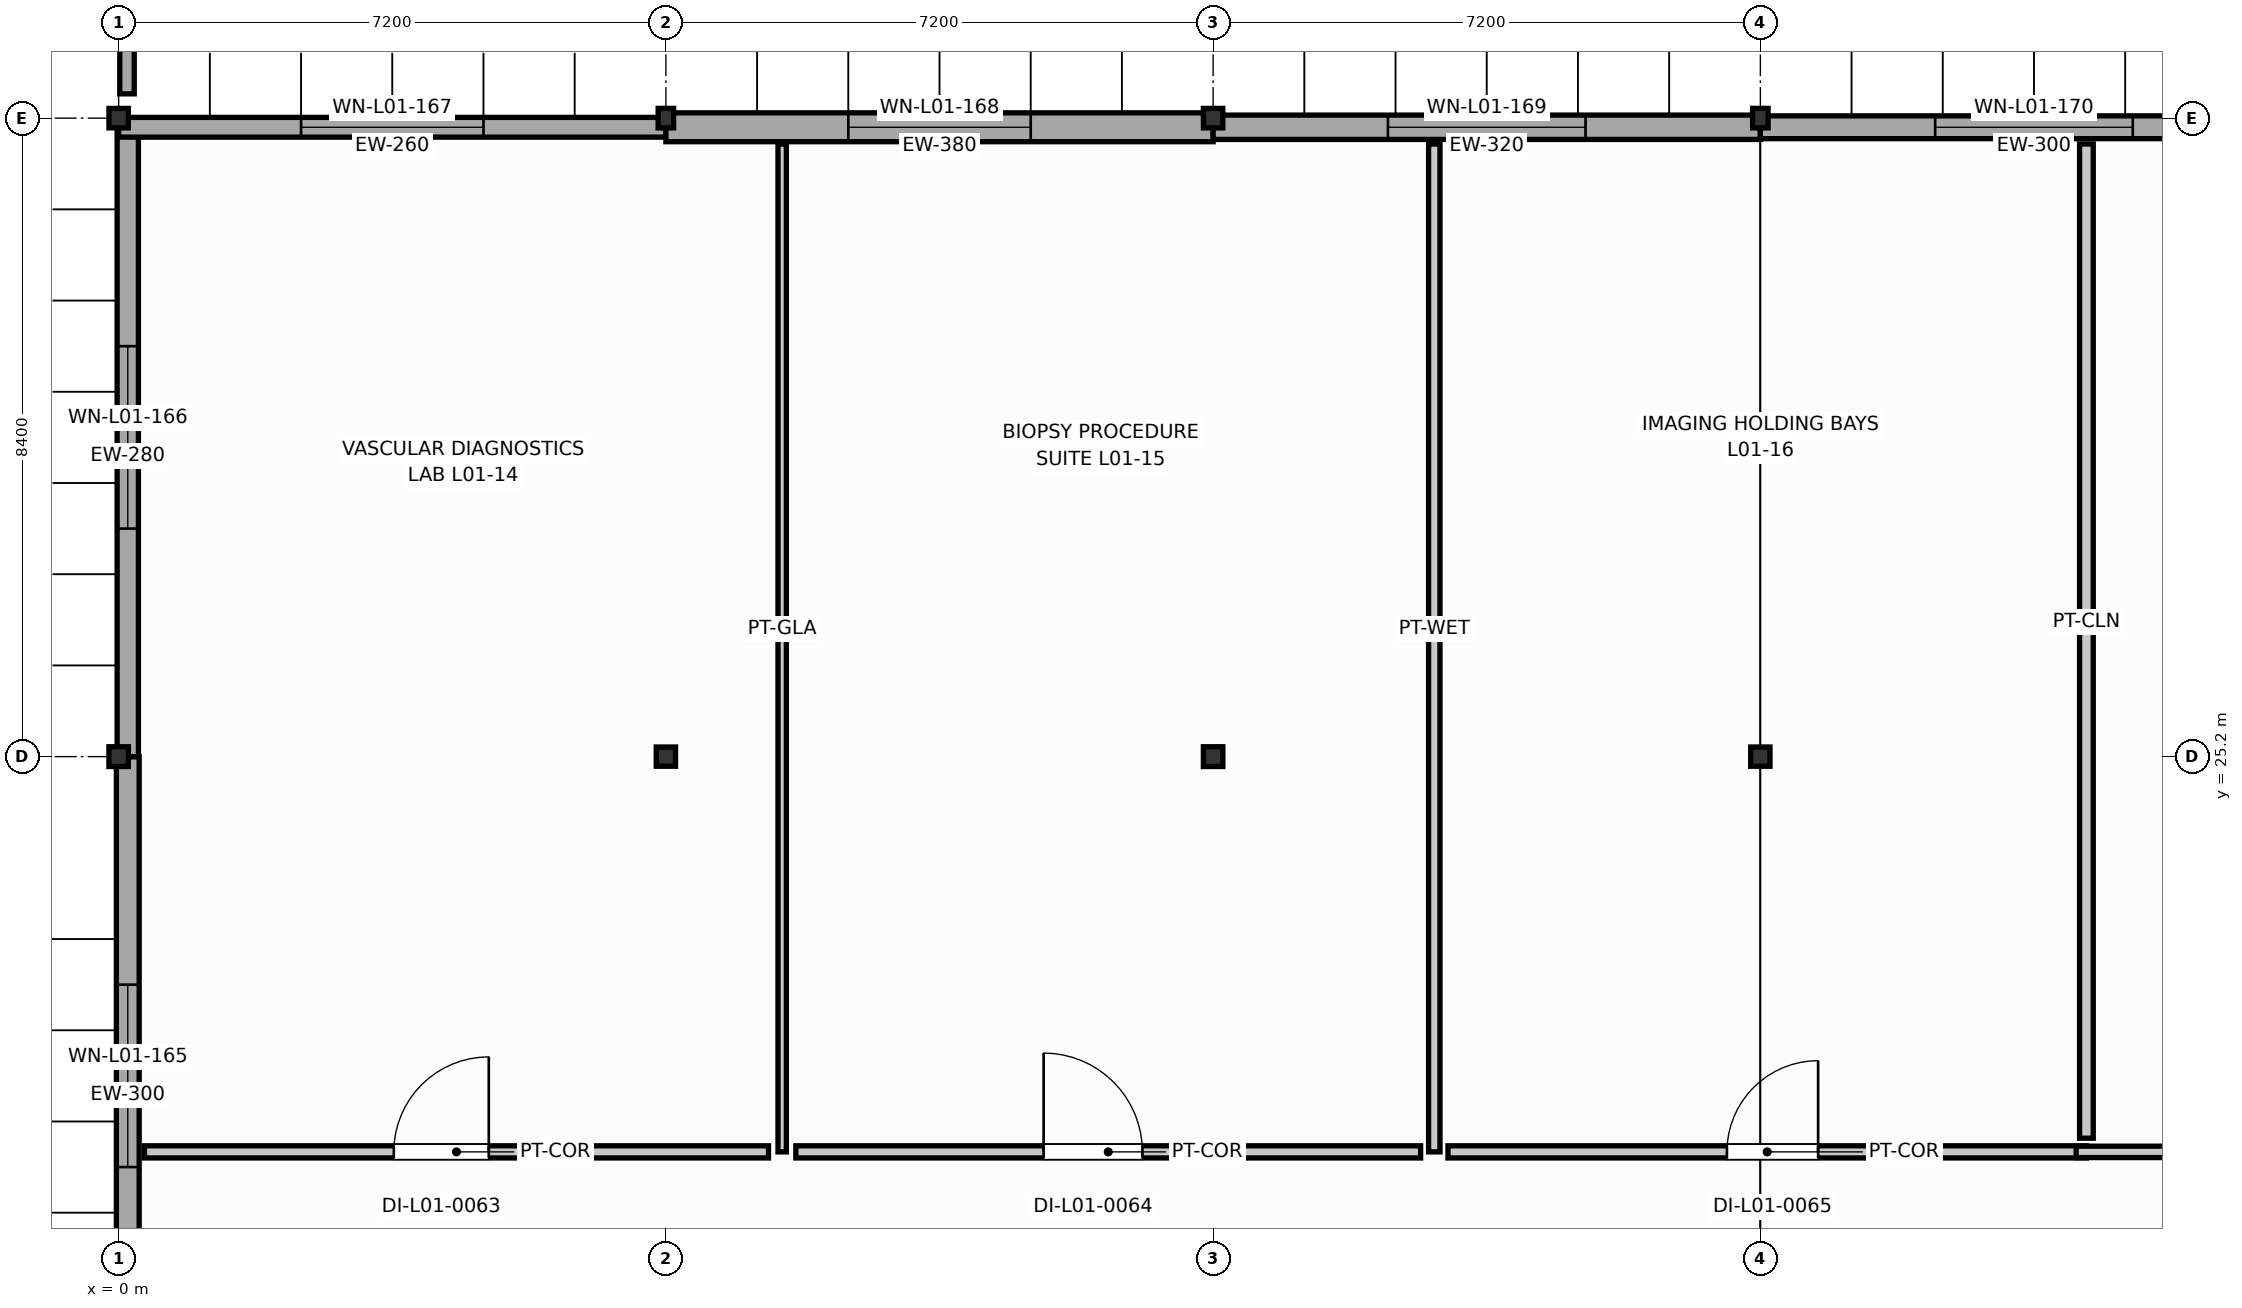
"""IFC4 building model, lengths in metres.
Left out: names, types, materials, properties, quantities, classifications, styles, units other than length and angle.
Written with IfcOpenShell. Run it as: python <this file> out.ifc"""

import sys

from ifc_helpers import new_model, si_unit, direction, frame, frame_2d, origin, origin_2d, place, context, subcontext, project, spatial, rectangle, i_section, extrude, element, fill, save


model = new_model("IFC4")
c1 = context("Model", 3, precision=1e-05, world=origin(), true_north=direction((0.0, 1.0)))
c2 = subcontext(c1, "Body", "Model", "MODEL_VIEW")
j1 = project(units=[si_unit("LENGTHUNIT", "METRE"), si_unit("PLANEANGLEUNIT", "RADIAN")], contexts=[c1])
p1 = place(None, origin())
s1 = spatial("IfcSite", under=j1, at=p1, CompositionType="ELEMENT")
p2 = place(p1, origin())
s2 = spatial("IfcBuilding", under=s1, at=p2, CompositionType="ELEMENT")
p3 = place(p2, frame((0.0, 0.0, 4.8)))
s3 = spatial("IfcBuildingStorey", under=s2, at=p3, CompositionType="ELEMENT", Elevation=4.8)
p4 = place(p3, frame((0.0, 25.2, 0.0), z_axis=(0.0, 0.0, 1.0), x_axis=(1.0, 0.0, 0.0)))
e1 = element("IfcColumn", 1, at=p4, inside=s3, PredefinedType="COLUMN", context=c2, shape_type="SweptSolid", body=[
    extrude(i_section(OverallWidth=0.256, OverallDepth=0.26, WebThickness=0.011, FlangeThickness=0.017, FilletRadius=0.013, at=origin_2d()), origin(), (0.0, 0.0, 1.0), 4.2),
])
p5 = place(p3, frame((0.0, 33.6, 0.0), z_axis=(0.0, 0.0, 1.0), x_axis=(1.0, 0.0, 0.0)))
e2 = element("IfcColumn", 2, at=p5, inside=s3, PredefinedType="COLUMN", context=c2, shape_type="SweptSolid", body=[
    extrude(i_section(OverallWidth=0.255, OverallDepth=0.256, WebThickness=0.01, FlangeThickness=0.016, FilletRadius=0.013, at=origin_2d()), origin(), (0.0, 0.0, 1.0), 4.2),
])
p6 = place(p3, frame((7.2, 25.2, 0.0), z_axis=(0.0, 0.0, 1.0), x_axis=(1.0, 0.0, 0.0)))
e3 = element("IfcColumn", 3, at=p6, inside=s3, PredefinedType="COLUMN", context=c2, shape_type="SweptSolid", body=[
    extrude(i_section(OverallWidth=0.254, OverallDepth=0.253, WebThickness=0.009, FlangeThickness=0.014, FilletRadius=0.013, at=origin_2d()), origin(), (0.0, 0.0, 1.0), 4.2),
])
p7 = place(p3, frame((7.2, 33.6, 0.0), z_axis=(0.0, 0.0, 1.0), x_axis=(1.0, 0.0, 0.0)))
e4 = element("IfcColumn", 4, at=p7, inside=s3, PredefinedType="COLUMN", context=c2, shape_type="SweptSolid", body=[
    extrude(i_section(OverallWidth=0.204, OverallDepth=0.257, WebThickness=0.009, FlangeThickness=0.016, FilletRadius=0.013, at=origin_2d()), origin(), (0.0, 0.0, 1.0), 4.2),
])
p8 = place(p3, frame((14.4, 25.2, 0.0), z_axis=(0.0, 0.0, 1.0), x_axis=(1.0, 0.0, 0.0)))
e5 = element("IfcColumn", 5, at=p8, inside=s3, PredefinedType="COLUMN", context=c2, shape_type="SweptSolid", body=[
    extrude(i_section(OverallWidth=0.256, OverallDepth=0.26, WebThickness=0.011, FlangeThickness=0.017, FilletRadius=0.013, at=origin_2d()), origin(), (0.0, 0.0, 1.0), 4.2),
])
p9 = place(p3, frame((14.4, 33.6, 0.0), z_axis=(0.0, 0.0, 1.0), x_axis=(1.0, 0.0, 0.0)))
e6 = element("IfcColumn", 6, at=p9, inside=s3, PredefinedType="COLUMN", context=c2, shape_type="SweptSolid", body=[
    extrude(i_section(OverallWidth=0.255, OverallDepth=0.256, WebThickness=0.01, FlangeThickness=0.016, FilletRadius=0.013, at=origin_2d()), origin(), (0.0, 0.0, 1.0), 4.2),
])
p10 = place(p3, frame((21.6, 25.2, 0.0), z_axis=(0.0, 0.0, 1.0), x_axis=(1.0, 0.0, 0.0)))
e7 = element("IfcColumn", 7, at=p10, inside=s3, PredefinedType="COLUMN", context=c2, shape_type="SweptSolid", body=[
    extrude(i_section(OverallWidth=0.254, OverallDepth=0.253, WebThickness=0.009, FlangeThickness=0.014, FilletRadius=0.013, at=origin_2d()), origin(), (0.0, 0.0, 1.0), 4.2),
])
p11 = place(p3, frame((21.6, 33.6, 0.0), z_axis=(0.0, 0.0, 1.0), x_axis=(1.0, 0.0, 0.0)))
e8 = element("IfcColumn", 8, at=p11, inside=s3, PredefinedType="COLUMN", context=c2, shape_type="SweptSolid", body=[
    extrude(i_section(OverallWidth=0.204, OverallDepth=0.257, WebThickness=0.009, FlangeThickness=0.016, FilletRadius=0.013, at=origin_2d()), origin(), (0.0, 0.0, 1.0), 4.2),
])
p12 = place(p3, frame((0.12, 16.8, 0.0), z_axis=(0.0, 0.0, 1.0), x_axis=(0.0, 1.0, 0.0)))
e9 = element("IfcWall", 9, at=p12, inside=s3, PredefinedType="SOLIDWALL", context=c2, shape_type="SweptSolid", body=[
    extrude(rectangle(XDim=8.4, YDim=0.3, at=frame_2d((4.2, 0.0))), origin(), (0.0, 0.0, 1.0), 3.091),
])
p13 = place(p12, frame((3.0, 0.0, 0.95)))
e10 = element("IfcOpeningElement", 10, at=p13, cuts=e9, PredefinedType="OPENING", context=c2, shape_type="SweptSolid", body=[
    extrude(rectangle(XDim=2.4, YDim=1.15, at=frame_2d((1.2, 0.575))), frame((0.0, 0.16, 0.0), z_axis=(0.0, -1.0, 0.0), x_axis=(1.0, 0.0, 0.0)), (0.0, 0.0, 1.0), 0.32),
])
p14 = place(p3, frame((0.12, 25.2, 0.0), z_axis=(0.0, 0.0, 1.0), x_axis=(0.0, 1.0, 0.0)))
e11 = element("IfcWall", 11, at=p14, inside=s3, PredefinedType="SOLIDWALL", context=c2, shape_type="SweptSolid", body=[
    extrude(rectangle(XDim=8.4, YDim=0.28, at=frame_2d((4.2, 0.0))), origin(), (0.0, 0.0, 1.0), 3.091),
])
p15 = place(p14, frame((3.0, 0.0, 0.95)))
e12 = element("IfcOpeningElement", 12, at=p15, cuts=e11, PredefinedType="OPENING", context=c2, shape_type="SweptSolid", body=[
    extrude(rectangle(XDim=2.4, YDim=1.35, at=frame_2d((1.2, 0.675))), frame((0.0, 0.15, 0.0), z_axis=(0.0, -1.0, 0.0), x_axis=(1.0, 0.0, 0.0)), (0.0, 0.0, 1.0), 0.3),
])
p16 = place(p3, frame((0.0, 33.48, 0.0), z_axis=(0.0, 0.0, 1.0), x_axis=(1.0, 0.0, 0.0)))
e13 = element("IfcWall", 13, at=p16, inside=s3, PredefinedType="SOLIDWALL", context=c2, shape_type="SweptSolid", body=[
    extrude(rectangle(XDim=7.2, YDim=0.26, at=frame_2d((3.6, 0.0))), origin(), (0.0, 0.0, 1.0), 3.482),
])
p17 = place(p16, frame((2.4, 0.0, 0.95)))
e14 = element("IfcOpeningElement", 14, at=p17, cuts=e13, PredefinedType="OPENING", context=c2, shape_type="SweptSolid", body=[
    extrude(rectangle(XDim=2.4, YDim=1.55, at=frame_2d((1.2, 0.775))), frame((0.0, 0.14, 0.0), z_axis=(0.0, -1.0, 0.0), x_axis=(1.0, 0.0, 0.0)), (0.0, 0.0, 1.0), 0.28),
])
p18 = place(p3, frame((7.2, 33.48, 0.0), z_axis=(0.0, 0.0, 1.0), x_axis=(1.0, 0.0, 0.0)))
e15 = element("IfcWall", 15, at=p18, inside=s3, PredefinedType="SOLIDWALL", context=c2, shape_type="SweptSolid", body=[
    extrude(rectangle(XDim=7.2, YDim=0.38, at=frame_2d((3.6, 0.0))), origin(), (0.0, 0.0, 1.0), 3.482),
])
p19 = place(p18, frame((2.4, 0.0, 0.95)))
e16 = element("IfcOpeningElement", 16, at=p19, cuts=e15, PredefinedType="OPENING", context=c2, shape_type="SweptSolid", body=[
    extrude(rectangle(XDim=2.4, YDim=1.75, at=frame_2d((1.2, 0.875))), frame((0.0, 0.2, 0.0), z_axis=(0.0, -1.0, 0.0), x_axis=(1.0, 0.0, 0.0)), (0.0, 0.0, 1.0), 0.4),
])
p20 = place(p3, frame((14.4, 33.48, 0.0), z_axis=(0.0, 0.0, 1.0), x_axis=(1.0, 0.0, 0.0)))
e17 = element("IfcWall", 17, at=p20, inside=s3, PredefinedType="SOLIDWALL", context=c2, shape_type="SweptSolid", body=[
    extrude(rectangle(XDim=7.2, YDim=0.32, at=frame_2d((3.6, 0.0))), origin(), (0.0, 0.0, 1.0), 3.482),
])
p21 = place(p20, frame((2.3, 0.0, 0.95)))
e18 = element("IfcOpeningElement", 18, at=p21, cuts=e17, PredefinedType="OPENING", context=c2, shape_type="SweptSolid", body=[
    extrude(rectangle(XDim=2.6, YDim=1.15, at=frame_2d((1.3, 0.575))), frame((0.0, 0.17, 0.0), z_axis=(0.0, -1.0, 0.0), x_axis=(1.0, 0.0, 0.0)), (0.0, 0.0, 1.0), 0.34),
])
p22 = place(p3, frame((21.6, 33.48, 0.0), z_axis=(0.0, 0.0, 1.0), x_axis=(1.0, 0.0, 0.0)))
e19 = element("IfcWall", 19, at=p22, inside=s3, PredefinedType="SOLIDWALL", context=c2, shape_type="SweptSolid", body=[
    extrude(rectangle(XDim=7.2, YDim=0.3, at=frame_2d((3.6, 0.0))), origin(), (0.0, 0.0, 1.0), 3.245),
])
p23 = place(p22, frame((2.3, 0.0, 0.95)))
e20 = element("IfcOpeningElement", 20, at=p23, cuts=e19, PredefinedType="OPENING", context=c2, shape_type="SweptSolid", body=[
    extrude(rectangle(XDim=2.6, YDim=1.35, at=frame_2d((1.3, 0.675))), frame((0.0, 0.16, 0.0), z_axis=(0.0, -1.0, 0.0), x_axis=(1.0, 0.0, 0.0)), (0.0, 0.0, 1.0), 0.32),
])
p24 = place(p3, frame((0.11, 41.723, 0.0), z_axis=(0.0, 0.0, 1.0), x_axis=(0.0, -1.0, 0.0)))
e21 = element("IfcWall", 21, at=p24, inside=s3, PredefinedType="PARAPET", context=c2, shape_type="SweptSolid", body=[
    extrude(rectangle(XDim=7.803, YDim=0.19, at=frame_2d((3.902, 0.0))), origin(), (0.0, 0.0, 1.0), 1.15),
])
p25 = place(p3, frame((8.73, 33.26, 0.0), z_axis=(0.0, 0.0, 1.0), x_axis=(0.0, -1.0, 0.0)))
e22 = element("IfcWall", 22, at=p25, inside=s3, PredefinedType="MOVABLE", context=c2, shape_type="SweptSolid", body=[
    extrude(rectangle(XDim=13.26, YDim=0.11, at=frame_2d((6.63, 0.0))), origin(), (0.0, 0.0, 1.0), 3.252),
])
p26 = place(p3, frame((8.55, 20.0, 0.0), z_axis=(0.0, 0.0, 1.0), x_axis=(-1.0, 0.0, 0.0)))
e23 = element("IfcWall", 23, at=p26, inside=s3, PredefinedType="PARTITIONING", context=c2, shape_type="SweptSolid", body=[
    extrude(rectangle(XDim=8.21, YDim=0.16, at=frame_2d((4.105, 0.0))), origin(), (0.0, 0.0, 1.0), 3.535),
])
p27 = place(p26, frame((3.68, 0.0, 0.0)))
e24 = element("IfcOpeningElement", 24, at=p27, cuts=e23, PredefinedType="OPENING", context=c2, shape_type="SweptSolid", body=[
    extrude(rectangle(XDim=1.25, YDim=2.15, at=frame_2d((0.625, 1.075))), frame((0.0, 0.09, 0.0), z_axis=(0.0, -1.0, 0.0), x_axis=(1.0, 0.0, 0.0)), (0.0, 0.0, 1.0), 0.18),
])
p28 = place(p3, frame((17.31, 33.26, 0.0), z_axis=(0.0, 0.0, 1.0), x_axis=(0.0, -1.0, 0.0)))
e25 = element("IfcWall", 25, at=p28, inside=s3, PredefinedType="PLUMBINGWALL", context=c2, shape_type="SweptSolid", body=[
    extrude(rectangle(XDim=13.26, YDim=0.15, at=frame_2d((6.63, 0.0))), origin(), (0.0, 0.0, 1.0), 3.257),
])
p29 = place(p3, frame((17.13, 20.0, 0.0), z_axis=(0.0, 0.0, 1.0), x_axis=(-1.0, 0.0, 0.0)))
e26 = element("IfcWall", 26, at=p29, inside=s3, PredefinedType="PARTITIONING", context=c2, shape_type="SweptSolid", body=[
    extrude(rectangle(XDim=8.22, YDim=0.16, at=frame_2d((4.11, 0.0))), origin(), (0.0, 0.0, 1.0), 3.535),
])
p30 = place(p29, frame((3.66, 0.0, 0.0)))
e27 = element("IfcOpeningElement", 27, at=p30, cuts=e26, PredefinedType="OPENING", context=c2, shape_type="SweptSolid", body=[
    extrude(rectangle(XDim=1.3, YDim=2.15, at=frame_2d((0.65, 1.075))), frame((0.0, 0.09, 0.0), z_axis=(0.0, -1.0, 0.0), x_axis=(1.0, 0.0, 0.0)), (0.0, 0.0, 1.0), 0.18),
])
p31 = place(p3, frame((25.89, 20.0, 0.0), z_axis=(0.0, 0.0, 1.0), x_axis=(-1.0, 0.0, 0.0)))
e28 = element("IfcWall", 28, at=p31, inside=s3, PredefinedType="PARTITIONING", context=c2, shape_type="SweptSolid", body=[
    extrude(rectangle(XDim=8.4, YDim=0.16, at=frame_2d((4.2, 0.0))), origin(), (0.0, 0.0, 1.0), 3.531),
])
p32 = place(p31, frame((3.53, 0.0, 0.0)))
e29 = element("IfcOpeningElement", 29, at=p32, cuts=e28, PredefinedType="OPENING", context=c2, shape_type="SweptSolid", body=[
    extrude(rectangle(XDim=1.2, YDim=2.15, at=frame_2d((0.6, 1.075))), frame((0.0, 0.09, 0.0), z_axis=(0.0, -1.0, 0.0), x_axis=(1.0, 0.0, 0.0)), (0.0, 0.0, 1.0), 0.18),
])
p33 = place(p3, frame((25.89, 33.26, 0.0), z_axis=(0.0, 0.0, 1.0), x_axis=(0.0, -1.0, 0.0)))
e30 = element("IfcWall", 30, at=p33, inside=s3, PredefinedType="PARTITIONING", context=c2, shape_type="SweptSolid", body=[
    extrude(rectangle(XDim=13.08, YDim=0.18, at=frame_2d((6.54, 0.0))), origin(), (0.0, 0.0, 1.0), 3.324),
])
p34 = place(p3, frame((34.47, 20.0, 0.0), z_axis=(0.0, 0.0, 1.0), x_axis=(-1.0, 0.0, 0.0)))
e31 = element("IfcWall", 31, at=p34, inside=s3, PredefinedType="PLUMBINGWALL", context=c2, shape_type="SweptSolid", body=[
    extrude(rectangle(XDim=8.715, YDim=0.15, at=frame_2d((4.357, 0.0))), origin(), (0.0, 0.0, 1.0), 3.404),
])
p35 = place(p34, frame((3.788, 0.0, 0.0)))
e32 = element("IfcOpeningElement", 32, at=p35, cuts=e31, PredefinedType="OPENING", context=c2, shape_type="SweptSolid", body=[
    extrude(rectangle(XDim=1.0, YDim=2.1, at=frame_2d((0.5, 1.05))), frame((0.0, 0.085, 0.0), z_axis=(0.0, -1.0, 0.0), x_axis=(1.0, 0.0, 0.0)), (0.0, 0.0, 1.0), 0.17),
])
p36 = place(p13, origin())
e33 = element("IfcWindow", 33, at=p36, inside=s3, PartitioningType="SINGLE_PANEL", PredefinedType="WINDOW", context=c2, shape_type="SweptSolid", body=[
    extrude(rectangle(XDim=2.4, YDim=1.15, at=frame_2d((1.2, 0.575))), frame((0.0, 0.03, 0.0), z_axis=(0.0, -1.0, 0.0), x_axis=(1.0, 0.0, 0.0)), (0.0, 0.0, 1.0), 0.06),
])
fill(e10, e33)
p37 = place(p15, origin())
e34 = element("IfcWindow", 34, at=p37, inside=s3, PartitioningType="SINGLE_PANEL", PredefinedType="WINDOW", context=c2, shape_type="SweptSolid", body=[
    extrude(rectangle(XDim=2.4, YDim=1.35, at=frame_2d((1.2, 0.675))), frame((0.0, 0.03, 0.0), z_axis=(0.0, -1.0, 0.0), x_axis=(1.0, 0.0, 0.0)), (0.0, 0.0, 1.0), 0.06),
])
fill(e12, e34)
p38 = place(p17, origin())
e35 = element("IfcWindow", 35, at=p38, inside=s3, PartitioningType="SINGLE_PANEL", PredefinedType="WINDOW", context=c2, shape_type="SweptSolid", body=[
    extrude(rectangle(XDim=2.4, YDim=1.55, at=frame_2d((1.2, 0.775))), frame((0.0, 0.03, 0.0), z_axis=(0.0, -1.0, 0.0), x_axis=(1.0, 0.0, 0.0)), (0.0, 0.0, 1.0), 0.06),
])
fill(e14, e35)
p39 = place(p19, origin())
e36 = element("IfcWindow", 36, at=p39, inside=s3, PartitioningType="SINGLE_PANEL", PredefinedType="WINDOW", context=c2, shape_type="SweptSolid", body=[
    extrude(rectangle(XDim=2.4, YDim=1.75, at=frame_2d((1.2, 0.875))), frame((0.0, 0.03, 0.0), z_axis=(0.0, -1.0, 0.0), x_axis=(1.0, 0.0, 0.0)), (0.0, 0.0, 1.0), 0.06),
])
fill(e16, e36)
p40 = place(p21, origin())
e37 = element("IfcWindow", 37, at=p40, inside=s3, PartitioningType="SINGLE_PANEL", PredefinedType="WINDOW", context=c2, shape_type="SweptSolid", body=[
    extrude(rectangle(XDim=2.6, YDim=1.15, at=frame_2d((1.3, 0.575))), frame((0.0, 0.03, 0.0), z_axis=(0.0, -1.0, 0.0), x_axis=(1.0, 0.0, 0.0)), (0.0, 0.0, 1.0), 0.06),
])
fill(e18, e37)
p41 = place(p23, origin())
e38 = element("IfcWindow", 38, at=p41, inside=s3, PartitioningType="SINGLE_PANEL", PredefinedType="WINDOW", context=c2, shape_type="SweptSolid", body=[
    extrude(rectangle(XDim=2.6, YDim=1.35, at=frame_2d((1.3, 0.675))), frame((0.0, 0.03, 0.0), z_axis=(0.0, -1.0, 0.0), x_axis=(1.0, 0.0, 0.0)), (0.0, 0.0, 1.0), 0.06),
])
fill(e20, e38)
p42 = place(p27, frame((1.25, 0.0, 0.0), z_axis=(0.0, 0.0, 1.0), x_axis=(-1.0, 0.0, 0.0)))
e39 = element("IfcDoor", 39, at=p42, inside=s3, OperationType="SINGLE_SWING_RIGHT", PredefinedType="DOOR", context=c2, shape_type="SweptSolid", body=[
    extrude(rectangle(XDim=1.25, YDim=2.15, at=frame_2d((0.625, 1.075))), frame((0.0, 0.025, 0.0), z_axis=(0.0, -1.0, 0.0), x_axis=(1.0, 0.0, 0.0)), (0.0, 0.0, 1.0), 0.05),
])
fill(e24, e39)
p43 = place(p30, frame((1.3, 0.0, 0.0), z_axis=(0.0, 0.0, 1.0), x_axis=(-1.0, 0.0, 0.0)))
e40 = element("IfcDoor", 40, at=p43, inside=s3, OperationType="SINGLE_SWING_LEFT", PredefinedType="DOOR", context=c2, shape_type="SweptSolid", body=[
    extrude(rectangle(XDim=1.3, YDim=2.15, at=frame_2d((0.65, 1.075))), frame((0.0, 0.025, 0.0), z_axis=(0.0, -1.0, 0.0), x_axis=(1.0, 0.0, 0.0)), (0.0, 0.0, 1.0), 0.05),
])
fill(e27, e40)
p44 = place(p32, frame((1.2, 0.0, 0.0), z_axis=(0.0, 0.0, 1.0), x_axis=(-1.0, 0.0, 0.0)))
e41 = element("IfcDoor", 41, at=p44, inside=s3, OperationType="SINGLE_SWING_RIGHT", PredefinedType="DOOR", context=c2, shape_type="SweptSolid", body=[
    extrude(rectangle(XDim=1.2, YDim=2.15, at=frame_2d((0.6, 1.075))), frame((0.0, 0.025, 0.0), z_axis=(0.0, -1.0, 0.0), x_axis=(1.0, 0.0, 0.0)), (0.0, 0.0, 1.0), 0.05),
])
fill(e29, e41)
save(model, sys.argv[1])
